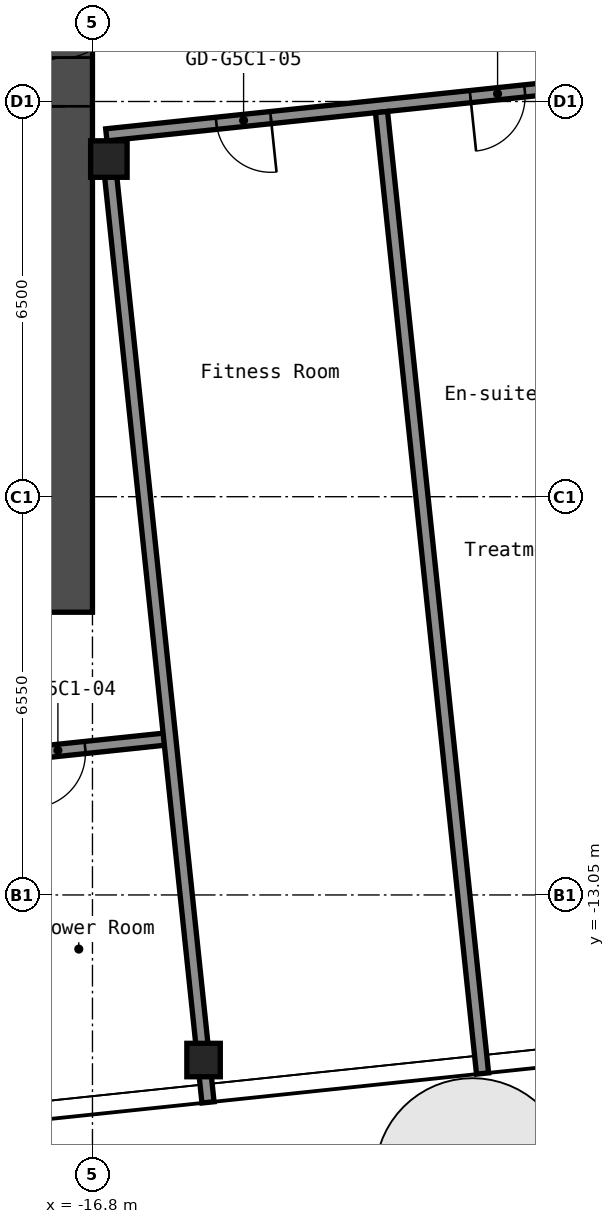
"""IFC4 building model, lengths in metres.
Left out: names, types, materials, properties, quantities, classifications, styles, units other than length and angle.
Written with IfcOpenShell. Run it as: python <this file> out.ifc"""

import sys

from ifc_helpers import new_model, si_unit, direction, frame, frame_2d, origin, origin_2d, place, context, subcontext, project, spatial, rectangle, hollow_rectangle, extrude, element, fill, save


model = new_model("IFC4")
c1 = context("Model", 3, precision=1e-05, world=origin(), true_north=direction((0.0, 1.0)))
c2 = subcontext(c1, "Body", "Model", "MODEL_VIEW")
j1 = project(units=[si_unit("LENGTHUNIT", "METRE"), si_unit("PLANEANGLEUNIT", "RADIAN")], contexts=[c1])
p1 = place(None, origin())
s1 = spatial("IfcSite", under=j1, at=p1, CompositionType="ELEMENT")
p2 = place(p1, origin())
s2 = spatial("IfcBuilding", under=s1, at=p2, CompositionType="ELEMENT")
p3 = place(p2, frame((0.0, 0.0, 258.2)))
s3 = spatial("IfcBuildingStorey", under=s2, at=p3, CompositionType="ELEMENT", Elevation=258.2)
p4 = place(p3, frame((-14.973, -15.765, 0.0), z_axis=(0.0, 0.0, 1.0), x_axis=(1.0, 0.0, 0.0)))
e1 = element("IfcColumn", 1, at=p4, inside=s3, PredefinedType="COLUMN", context=c2, shape_type="SweptSolid", body=[
    extrude(hollow_rectangle(XDim=0.55, YDim=0.55, WallThickness=0.022, InnerFilletRadius=0.033, OuterFilletRadius=0.055, at=origin_2d()), origin(), (0.0, 0.0, 1.0), 2.75),
])
p5 = place(p3, frame((-16.53, -0.947, 0.0), z_axis=(0.0, 0.0, 1.0), x_axis=(1.0, 0.0, 0.0)))
e2 = element("IfcColumn", 2, at=p5, inside=s3, PredefinedType="COLUMN", context=c2, shape_type="SweptSolid", body=[
    extrude(hollow_rectangle(XDim=0.6, YDim=0.6, WallThickness=0.025, InnerFilletRadius=0.038, OuterFilletRadius=0.062, at=origin_2d()), origin(), (0.0, 0.0, 1.0), 2.75),
])
p6 = place(p3, frame((-17.25, -8.4, 0.0), z_axis=(0.0, 0.0, 1.0), x_axis=(0.0, 1.0, 0.0)))
e3 = element("IfcWall", 3, at=p6, inside=s3, PredefinedType="SHEAR", context=c2, shape_type="SweptSolid", body=[
    extrude(rectangle(XDim=16.8, YDim=0.9, at=frame_2d((8.4, 0.0))), origin(), (0.0, 0.0, 1.0), 2.75),
])
p7 = place(p6, frame((8.321, 0.0, 0.0)))
e4 = element("IfcOpeningElement", 4, at=p7, cuts=e3, PredefinedType="OPENING", context=c2, shape_type="SweptSolid", body=[
    extrude(rectangle(XDim=1.6, YDim=2.1, at=frame_2d((0.8, 1.05))), frame((0.0, 0.46, 0.0), z_axis=(0.0, -1.0, 0.0), x_axis=(1.0, 0.0, 0.0)), (0.0, 0.0, 1.0), 0.92),
])
p8 = place(p3, frame((-36.712, -12.705, 0.0), z_axis=(0.0, 0.0, 1.0), x_axis=(0.994522460242, 0.104523088709, 0.0)))
e5 = element("IfcWall", 5, at=p8, inside=s3, PredefinedType="PARTITIONING", context=c2, shape_type="SweptSolid", body=[
    extrude(rectangle(XDim=21.3, YDim=0.2, at=frame_2d((10.65, 0.0))), origin(), (0.0, 0.0, 1.0), 2.75),
])
p9 = place(p8, frame((3.05, 0.0, 0.0)))
e6 = element("IfcOpeningElement", 6, at=p9, cuts=e5, PredefinedType="OPENING", context=c2, shape_type="SweptSolid", body=[
    extrude(rectangle(XDim=1.0, YDim=2.1, at=frame_2d((0.5, 1.05))), frame((0.0, 0.11, 0.0), z_axis=(0.0, -1.0, 0.0), x_axis=(1.0, 0.0, 0.0)), (0.0, 0.0, 1.0), 0.22),
])
p10 = place(p8, frame((8.2, 0.0, 0.0)))
e7 = element("IfcOpeningElement", 7, at=p10, cuts=e5, PredefinedType="OPENING", context=c2, shape_type="SweptSolid", body=[
    extrude(rectangle(XDim=1.0, YDim=2.1, at=frame_2d((0.5, 1.05))), frame((0.0, 0.11, 0.0), z_axis=(0.0, -1.0, 0.0), x_axis=(1.0, 0.0, 0.0)), (0.0, 0.0, 1.0), 0.22),
])
p11 = place(p8, frame((14.8, 0.0, 0.0)))
e8 = element("IfcOpeningElement", 8, at=p11, cuts=e5, PredefinedType="OPENING", context=c2, shape_type="SweptSolid", body=[
    extrude(rectangle(XDim=0.9, YDim=2.1, at=frame_2d((0.45, 1.05))), frame((0.0, 0.11, 0.0), z_axis=(0.0, -1.0, 0.0), x_axis=(1.0, 0.0, 0.0)), (0.0, 0.0, 1.0), 0.22),
])
p12 = place(p8, frame((19.0, 0.0, 0.0)))
e9 = element("IfcOpeningElement", 9, at=p12, cuts=e5, PredefinedType="OPENING", context=c2, shape_type="SweptSolid", body=[
    extrude(rectangle(XDim=0.9, YDim=2.1, at=frame_2d((0.45, 1.05))), frame((0.0, 0.11, 0.0), z_axis=(0.0, -1.0, 0.0), x_axis=(1.0, 0.0, 0.0)), (0.0, 0.0, 1.0), 0.22),
])
p13 = place(p3, frame((-16.572, -0.549, 0.0), z_axis=(0.0, 0.0, 1.0), x_axis=(0.994521146831, 0.104535584879, 0.0)))
e10 = element("IfcWall", 10, at=p13, inside=s3, PredefinedType="PARTITIONING", context=c2, shape_type="SweptSolid", body=[
    extrude(rectangle(XDim=33.561, YDim=0.2, at=frame_2d((16.78, 0.0))), origin(), (0.0, 0.0, 1.0), 2.75),
])
p14 = place(p13, frame((1.82, 0.0, 0.0)))
e11 = element("IfcOpeningElement", 11, at=p14, cuts=e10, PredefinedType="OPENING", context=c2, shape_type="SweptSolid", body=[
    extrude(rectangle(XDim=0.9, YDim=2.1, at=frame_2d((0.45, 1.05))), frame((0.0, 0.11, 0.0), z_axis=(0.0, -1.0, 0.0), x_axis=(1.0, 0.0, 0.0)), (0.0, 0.0, 1.0), 0.22),
])
p15 = place(p13, frame((6.02, 0.0, 0.0)))
e12 = element("IfcOpeningElement", 12, at=p15, cuts=e10, PredefinedType="OPENING", context=c2, shape_type="SweptSolid", body=[
    extrude(rectangle(XDim=0.9, YDim=2.1, at=frame_2d((0.45, 1.05))), frame((0.0, 0.11, 0.0), z_axis=(0.0, -1.0, 0.0), x_axis=(1.0, 0.0, 0.0)), (0.0, 0.0, 1.0), 0.22),
])
p16 = place(p13, frame((11.25, 0.0, 0.0)))
e13 = element("IfcOpeningElement", 13, at=p16, cuts=e10, PredefinedType="OPENING", context=c2, shape_type="SweptSolid", body=[
    extrude(rectangle(XDim=1.0, YDim=2.1, at=frame_2d((0.5, 1.05))), frame((0.0, 0.11, 0.0), z_axis=(0.0, -1.0, 0.0), x_axis=(1.0, 0.0, 0.0)), (0.0, 0.0, 1.0), 0.22),
])
p17 = place(p13, frame((12.95, 0.0, 0.0)))
e14 = element("IfcOpeningElement", 14, at=p17, cuts=e10, PredefinedType="OPENING", context=c2, shape_type="SweptSolid", body=[
    extrude(rectangle(XDim=1.0, YDim=2.1, at=frame_2d((0.5, 1.05))), frame((0.0, 0.11, 0.0), z_axis=(0.0, -1.0, 0.0), x_axis=(1.0, 0.0, 0.0)), (0.0, 0.0, 1.0), 0.22),
])
p18 = place(p13, frame((17.86, 0.0, 0.0)))
e15 = element("IfcOpeningElement", 15, at=p18, cuts=e10, PredefinedType="OPENING", context=c2, shape_type="SweptSolid", body=[
    extrude(rectangle(XDim=0.9, YDim=2.1, at=frame_2d((0.45, 1.05))), frame((0.0, 0.11, 0.0), z_axis=(0.0, -1.0, 0.0), x_axis=(1.0, 0.0, 0.0)), (0.0, 0.0, 1.0), 0.22),
])
p19 = place(p13, frame((22.06, 0.0, 0.0)))
e16 = element("IfcOpeningElement", 16, at=p19, cuts=e10, PredefinedType="OPENING", context=c2, shape_type="SweptSolid", body=[
    extrude(rectangle(XDim=0.9, YDim=2.1, at=frame_2d((0.45, 1.05))), frame((0.0, 0.11, 0.0), z_axis=(0.0, -1.0, 0.0), x_axis=(1.0, 0.0, 0.0)), (0.0, 0.0, 1.0), 0.22),
])
p20 = place(p13, frame((29.4, 0.0, 0.0)))
e17 = element("IfcOpeningElement", 17, at=p20, cuts=e10, PredefinedType="OPENING", context=c2, shape_type="SweptSolid", body=[
    extrude(rectangle(XDim=1.6, YDim=2.1, at=frame_2d((0.8, 1.05))), frame((0.0, 0.11, 0.0), z_axis=(0.0, -1.0, 0.0), x_axis=(1.0, 0.0, 0.0)), (0.0, 0.0, 1.0), 0.22),
])
p21 = place(p3, frame((-14.9, -16.461, 0.0), z_axis=(0.0, 0.0, 1.0), x_axis=(-0.104523729364, 0.99452239291, 0.0)))
e18 = element("IfcWall", 18, at=p21, inside=s3, PredefinedType="PARTITIONING", context=c2, shape_type="SweptSolid", body=[
    extrude(rectangle(XDim=15.308, YDim=0.2, at=frame_2d((7.654, 0.0))), origin(), (0.0, 0.0, 1.0), 2.75),
])
p22 = place(p3, frame((-10.385, -15.987, 0.0), z_axis=(0.0, 0.0, 1.0), x_axis=(-0.104519331095, 0.994522855156, 0.0)))
e19 = element("IfcWall", 19, at=p22, inside=s3, PredefinedType="PARTITIONING", context=c2, shape_type="SweptSolid", body=[
    extrude(rectangle(XDim=15.9, YDim=0.2, at=frame_2d((7.95, 0.0))), origin(), (0.0, 0.0, 1.0), 2.75),
])
p23 = place(p7, origin())
e20 = element("IfcDoor", 20, at=p23, inside=s3, OperationType="DOUBLE_DOOR_SINGLE_SWING", PredefinedType="DOOR", context=c2, shape_type="SweptSolid", body=[
    extrude(rectangle(XDim=1.6, YDim=2.1, at=frame_2d((0.8, 1.05))), frame((0.0, 0.025, 0.0), z_axis=(0.0, -1.0, 0.0), x_axis=(1.0, 0.0, 0.0)), (0.0, 0.0, 1.0), 0.05),
])
fill(e4, e20)
p24 = place(p12, origin())
e21 = element("IfcDoor", 21, at=p24, inside=s3, OperationType="SINGLE_SWING_LEFT", PredefinedType="DOOR", context=c2, shape_type="SweptSolid", body=[
    extrude(rectangle(XDim=0.9, YDim=2.1, at=frame_2d((0.45, 1.05))), frame((0.0, 0.025, 0.0), z_axis=(0.0, -1.0, 0.0), x_axis=(1.0, 0.0, 0.0)), (0.0, 0.0, 1.0), 0.05),
])
fill(e9, e21)
p25 = place(p14, origin())
e22 = element("IfcDoor", 22, at=p25, inside=s3, OperationType="SINGLE_SWING_RIGHT", PredefinedType="DOOR", context=c2, shape_type="SweptSolid", body=[
    extrude(rectangle(XDim=0.9, YDim=2.1, at=frame_2d((0.45, 1.05))), frame((0.0, 0.025, 0.0), z_axis=(0.0, -1.0, 0.0), x_axis=(1.0, 0.0, 0.0)), (0.0, 0.0, 1.0), 0.05),
])
fill(e11, e22)
p26 = place(p15, origin())
e23 = element("IfcDoor", 23, at=p26, inside=s3, OperationType="SINGLE_SWING_LEFT", PredefinedType="DOOR", context=c2, shape_type="SweptSolid", body=[
    extrude(rectangle(XDim=0.9, YDim=2.1, at=frame_2d((0.45, 1.05))), frame((0.0, 0.025, 0.0), z_axis=(0.0, -1.0, 0.0), x_axis=(1.0, 0.0, 0.0)), (0.0, 0.0, 1.0), 0.05),
])
fill(e12, e23)
save(model, sys.argv[1])
